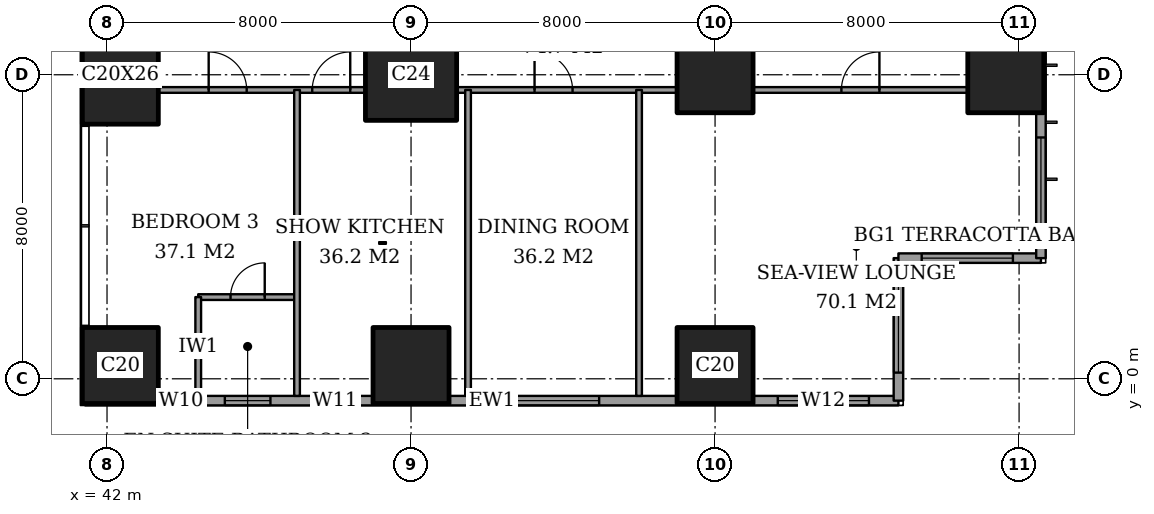
"""IFC4 building model, lengths in metres.
Left out: names, types, materials, properties, quantities, classifications, styles, units other than length and angle.
Written with IfcOpenShell. Run it as: python <this file> out.ifc"""

import sys

from ifc_helpers import new_model, si_unit, direction, frame, frame_2d, origin, origin_2d, place, context, subcontext, project, spatial, rectangle, extrude, element, fill, save


model = new_model("IFC4")
c1 = context("Model", 3, precision=1e-05, world=origin(), true_north=direction((0.0, 1.0)))
c2 = subcontext(c1, "Body", "Model", "MODEL_VIEW")
j1 = project(units=[si_unit("LENGTHUNIT", "METRE"), si_unit("PLANEANGLEUNIT", "RADIAN")], contexts=[c1])
p1 = place(None, origin())
s1 = spatial("IfcSite", under=j1, at=p1, CompositionType="ELEMENT")
p2 = place(p1, origin())
s2 = spatial("IfcBuilding", under=s1, at=p2, CompositionType="ELEMENT")
p3 = place(p2, frame((0.0, 0.0, 110.6)))
s3 = spatial("IfcBuildingStorey", under=s2, at=p3, CompositionType="ELEMENT", Elevation=110.6)
p4 = place(p3, frame((42.35, 0.35, 0.0), z_axis=(0.0, 0.0, 1.0), x_axis=(1.0, 0.0, 0.0)))
e1 = element("IfcColumn", 1, at=p4, inside=s3, PredefinedType="COLUMN", context=c2, shape_type="SweptSolid", body=[
    extrude(rectangle(XDim=2.0, YDim=2.0, at=origin_2d()), origin(), (0.0, 0.0, 1.0), 3.6),
])
p5 = place(p3, frame((42.35, 8.0, 0.0), z_axis=(0.0, 0.0, 1.0), x_axis=(1.0, 0.0, 0.0)))
e2 = element("IfcColumn", 2, at=p5, inside=s3, PredefinedType="COLUMN", context=c2, shape_type="SweptSolid", body=[
    extrude(rectangle(XDim=2.0, YDim=2.6, at=origin_2d()), origin(), (0.0, 0.0, 1.0), 3.6),
])
p6 = place(p3, frame((50.0, 0.35, 0.0), z_axis=(0.0, 0.0, 1.0), x_axis=(1.0, 0.0, 0.0)))
e3 = element("IfcColumn", 3, at=p6, inside=s3, PredefinedType="COLUMN", context=c2, shape_type="SweptSolid", body=[
    extrude(rectangle(XDim=2.0, YDim=2.0, at=origin_2d()), origin(), (0.0, 0.0, 1.0), 3.6),
])
p7 = place(p3, frame((50.0, 8.0, 0.0), z_axis=(0.0, 0.0, 1.0), x_axis=(1.0, 0.0, 0.0)))
e4 = element("IfcColumn", 4, at=p7, inside=s3, PredefinedType="COLUMN", context=c2, shape_type="SweptSolid", body=[
    extrude(rectangle(XDim=2.4, YDim=2.4, at=origin_2d()), origin(), (0.0, 0.0, 1.0), 3.6),
])
for number, where, z_axis, x_axis in (
    (5, (58.0, 0.35, 0.0), (0.0, 0.0, 1.0), (1.0, 0.0, 0.0)),
    (6, (58.0, 8.0, 0.0), (0.0, 0.0, 1.0), (1.0, 0.0, 0.0)),
    (7, (65.65, 8.0, 0.0), (0.0, 0.0, 1.0), (1.0, 0.0, 0.0)),
):
    element("IfcColumn", number, at=place(p3, frame(where, z_axis=z_axis, x_axis=x_axis)), inside=s3, PredefinedType="COLUMN", context=c2, shape_type="SweptSolid", body=[
        extrude(rectangle(XDim=2.0, YDim=2.0, at=origin_2d()), origin(), (0.0, 0.0, 1.0), 3.6),
    ])
p8 = place(p3, frame((41.425, -0.575, 0.0), z_axis=(0.0, 0.0, 1.0), x_axis=(1.0, 0.0, 0.0)))
e8 = element("IfcWall", 8, at=p8, inside=s3, PredefinedType="SOLIDWALL", context=c2, shape_type="SweptSolid", body=[
    extrude(rectangle(XDim=21.4, YDim=0.25, at=frame_2d((10.7, 0.0))), origin(), (0.0, 0.0, 1.0), 3.6),
])
p9 = place(p8, frame((2.225, 0.0, 0.4)))
e9 = element("IfcOpeningElement", 9, at=p9, cuts=e8, PredefinedType="OPENING", context=c2, shape_type="SweptSolid", body=[
    extrude(rectangle(XDim=0.6, YDim=2.2, at=frame_2d((0.3, 1.1))), frame((0.0, 0.135, 0.0), z_axis=(0.0, -1.0, 0.0), x_axis=(1.0, 0.0, 0.0)), (0.0, 0.0, 1.0), 0.27),
])
p10 = place(p8, frame((3.675, 0.0, 0.4)))
e10 = element("IfcOpeningElement", 10, at=p10, cuts=e8, PredefinedType="OPENING", context=c2, shape_type="SweptSolid", body=[
    extrude(rectangle(XDim=1.2, YDim=2.2, at=frame_2d((0.6, 1.1))), frame((0.0, 0.135, 0.0), z_axis=(0.0, -1.0, 0.0), x_axis=(1.0, 0.0, 0.0)), (0.0, 0.0, 1.0), 0.27),
])
p11 = place(p8, frame((5.975, 0.0, 0.4)))
e11 = element("IfcOpeningElement", 11, at=p11, cuts=e8, PredefinedType="OPENING", context=c2, shape_type="SweptSolid", body=[
    extrude(rectangle(XDim=1.2, YDim=2.2, at=frame_2d((0.6, 1.1))), frame((0.0, 0.135, 0.0), z_axis=(0.0, -1.0, 0.0), x_axis=(1.0, 0.0, 0.0)), (0.0, 0.0, 1.0), 0.27),
])
p12 = place(p8, frame((11.125, 0.0, 0.4)))
e12 = element("IfcOpeningElement", 12, at=p12, cuts=e8, PredefinedType="OPENING", context=c2, shape_type="SweptSolid", body=[
    extrude(rectangle(XDim=2.4, YDim=2.2, at=frame_2d((1.2, 1.1))), frame((0.0, 0.135, 0.0), z_axis=(0.0, -1.0, 0.0), x_axis=(1.0, 0.0, 0.0)), (0.0, 0.0, 1.0), 0.27),
])
p13 = place(p8, frame((18.225, 0.0, 0.4)))
e13 = element("IfcOpeningElement", 13, at=p13, cuts=e8, PredefinedType="OPENING", context=c2, shape_type="SweptSolid", body=[
    extrude(rectangle(XDim=2.4, YDim=2.2, at=frame_2d((1.2, 1.1))), frame((0.0, 0.135, 0.0), z_axis=(0.0, -1.0, 0.0), x_axis=(1.0, 0.0, 0.0)), (0.0, 0.0, 1.0), 0.27),
])
p14 = place(p3, frame((62.825, -0.575, 0.0), z_axis=(0.0, 0.0, 1.0), x_axis=(0.0, 1.0, 0.0)))
e14 = element("IfcWall", 14, at=p14, inside=s3, PredefinedType="SOLIDWALL", context=c2, shape_type="SweptSolid", body=[
    extrude(rectangle(XDim=3.75, YDim=0.25, at=frame_2d((1.875, 0.0))), origin(), (0.0, 0.0, 1.0), 3.6),
])
p15 = place(p14, frame((0.738, 0.0, 0.4)))
e15 = element("IfcOpeningElement", 15, at=p15, cuts=e14, PredefinedType="OPENING", context=c2, shape_type="SweptSolid", body=[
    extrude(rectangle(XDim=2.4, YDim=2.2, at=frame_2d((1.2, 1.1))), frame((0.0, 0.135, 0.0), z_axis=(0.0, -1.0, 0.0), x_axis=(1.0, 0.0, 0.0)), (0.0, 0.0, 1.0), 0.27),
])
p16 = place(p3, frame((62.825, 3.175, 0.0), z_axis=(0.0, 0.0, 1.0), x_axis=(1.0, 0.0, 0.0)))
e16 = element("IfcWall", 16, at=p16, inside=s3, PredefinedType="SOLIDWALL", context=c2, shape_type="SweptSolid", body=[
    extrude(rectangle(XDim=3.75, YDim=0.25, at=frame_2d((1.875, 0.0))), origin(), (0.0, 0.0, 1.0), 3.6),
])
p17 = place(p16, frame((0.613, 0.0, 0.4)))
e17 = element("IfcOpeningElement", 17, at=p17, cuts=e16, PredefinedType="OPENING", context=c2, shape_type="SweptSolid", body=[
    extrude(rectangle(XDim=2.4, YDim=2.2, at=frame_2d((1.2, 1.1))), frame((0.0, 0.135, 0.0), z_axis=(0.0, -1.0, 0.0), x_axis=(1.0, 0.0, 0.0)), (0.0, 0.0, 1.0), 0.27),
])
p18 = place(p3, frame((66.575, 3.175, 0.0), z_axis=(0.0, 0.0, 1.0), x_axis=(0.0, 1.0, 0.0)))
e18 = element("IfcWall", 18, at=p18, inside=s3, PredefinedType="SOLIDWALL", context=c2, shape_type="SweptSolid", body=[
    extrude(rectangle(XDim=41.65, YDim=0.25, at=frame_2d((20.825, 0.0))), origin(), (0.0, 0.0, 1.0), 3.6),
])
p19 = place(p18, frame((0.775, 0.0, 0.4)))
e19 = element("IfcOpeningElement", 19, at=p19, cuts=e18, PredefinedType="OPENING", context=c2, shape_type="SweptSolid", body=[
    extrude(rectangle(XDim=2.4, YDim=2.2, at=frame_2d((1.2, 1.1))), frame((0.0, 0.135, 0.0), z_axis=(0.0, -1.0, 0.0), x_axis=(1.0, 0.0, 0.0)), (0.0, 0.0, 1.0), 0.27),
])
p20 = place(p18, frame((6.1, 0.0, 0.4)))
e20 = element("IfcOpeningElement", 20, at=p20, cuts=e18, PredefinedType="OPENING", context=c2, shape_type="SweptSolid", body=[
    extrude(rectangle(XDim=1.2, YDim=2.2, at=frame_2d((0.6, 1.1))), frame((0.0, 0.135, 0.0), z_axis=(0.0, -1.0, 0.0), x_axis=(1.0, 0.0, 0.0)), (0.0, 0.0, 1.0), 0.27),
])
p21 = place(p18, frame((8.275, 0.0, 0.4)))
e21 = element("IfcOpeningElement", 21, at=p21, cuts=e18, PredefinedType="OPENING", context=c2, shape_type="SweptSolid", body=[
    extrude(rectangle(XDim=2.4, YDim=2.2, at=frame_2d((1.2, 1.1))), frame((0.0, 0.135, 0.0), z_axis=(0.0, -1.0, 0.0), x_axis=(1.0, 0.0, 0.0)), (0.0, 0.0, 1.0), 0.27),
])
p22 = place(p18, frame((15.775, 0.0, 0.4)))
e22 = element("IfcOpeningElement", 22, at=p22, cuts=e18, PredefinedType="OPENING", context=c2, shape_type="SweptSolid", body=[
    extrude(rectangle(XDim=2.4, YDim=2.2, at=frame_2d((1.2, 1.1))), frame((0.0, 0.135, 0.0), z_axis=(0.0, -1.0, 0.0), x_axis=(1.0, 0.0, 0.0)), (0.0, 0.0, 1.0), 0.27),
])
p23 = place(p18, frame((23.475, 0.0, 0.4)))
e23 = element("IfcOpeningElement", 23, at=p23, cuts=e18, PredefinedType="OPENING", context=c2, shape_type="SweptSolid", body=[
    extrude(rectangle(XDim=2.4, YDim=2.2, at=frame_2d((1.2, 1.1))), frame((0.0, 0.135, 0.0), z_axis=(0.0, -1.0, 0.0), x_axis=(1.0, 0.0, 0.0)), (0.0, 0.0, 1.0), 0.27),
])
p24 = place(p18, frame((30.975, 0.0, 0.4)))
e24 = element("IfcOpeningElement", 24, at=p24, cuts=e18, PredefinedType="OPENING", context=c2, shape_type="SweptSolid", body=[
    extrude(rectangle(XDim=2.4, YDim=2.2, at=frame_2d((1.2, 1.1))), frame((0.0, 0.135, 0.0), z_axis=(0.0, -1.0, 0.0), x_axis=(1.0, 0.0, 0.0)), (0.0, 0.0, 1.0), 0.27),
])
p25 = place(p18, frame((34.5, 0.0, 0.4)))
e25 = element("IfcOpeningElement", 25, at=p25, cuts=e18, PredefinedType="OPENING", context=c2, shape_type="SweptSolid", body=[
    extrude(rectangle(XDim=1.2, YDim=2.2, at=frame_2d((0.6, 1.1))), frame((0.0, 0.135, 0.0), z_axis=(0.0, -1.0, 0.0), x_axis=(1.0, 0.0, 0.0)), (0.0, 0.0, 1.0), 0.27),
])
p26 = place(p18, frame((38.475, 0.0, 0.4)))
e26 = element("IfcOpeningElement", 26, at=p26, cuts=e18, PredefinedType="OPENING", context=c2, shape_type="SweptSolid", body=[
    extrude(rectangle(XDim=2.4, YDim=2.2, at=frame_2d((1.2, 1.1))), frame((0.0, 0.135, 0.0), z_axis=(0.0, -1.0, 0.0), x_axis=(1.0, 0.0, 0.0)), (0.0, 0.0, 1.0), 0.27),
])
p27 = place(p3, frame((44.4, 2.15, 0.0), z_axis=(0.0, 0.0, 1.0), x_axis=(1.0, 0.0, 0.0)))
e27 = element("IfcWall", 27, at=p27, inside=s3, PredefinedType="PARTITIONING", context=c2, shape_type="SweptSolid", body=[
    extrude(rectangle(XDim=2.6, YDim=0.15, at=frame_2d((1.3, 0.0))), origin(), (0.0, 0.0, 1.0), 3.35),
])
p28 = place(p27, frame((0.85, 0.0, 0.0)))
e28 = element("IfcOpeningElement", 28, at=p28, cuts=e27, PredefinedType="OPENING", context=c2, shape_type="SweptSolid", body=[
    extrude(rectangle(XDim=0.9, YDim=2.1, at=frame_2d((0.45, 1.05))), frame((0.0, 0.085, 0.0), z_axis=(0.0, -1.0, 0.0), x_axis=(1.0, 0.0, 0.0)), (0.0, 0.0, 1.0), 0.17),
])
p29 = place(p3, frame((43.35, 7.6, 0.0), z_axis=(0.0, 0.0, 1.0), x_axis=(1.0, 0.0, 0.0)))
e29 = element("IfcWall", 29, at=p29, inside=s3, PredefinedType="PARTITIONING", context=c2, shape_type="SweptSolid", body=[
    extrude(rectangle(XDim=5.45, YDim=0.15, at=frame_2d((2.725, 0.0))), origin(), (0.0, 0.0, 1.0), 3.35),
])
p30 = place(p29, frame((4.05, 0.0, 0.0)))
e30 = element("IfcOpeningElement", 30, at=p30, cuts=e29, PredefinedType="OPENING", context=c2, shape_type="SweptSolid", body=[
    extrude(rectangle(XDim=1.0, YDim=2.1, at=frame_2d((0.5, 1.05))), frame((0.0, 0.085, 0.0), z_axis=(0.0, -1.0, 0.0), x_axis=(1.0, 0.0, 0.0)), (0.0, 0.0, 1.0), 0.17),
])
p31 = place(p29, frame((1.325, 0.0, 0.0)))
e31 = element("IfcOpeningElement", 31, at=p31, cuts=e29, PredefinedType="OPENING", context=c2, shape_type="SweptSolid", body=[
    extrude(rectangle(XDim=1.0, YDim=2.1, at=frame_2d((0.5, 1.05))), frame((0.0, 0.085, 0.0), z_axis=(0.0, -1.0, 0.0), x_axis=(1.0, 0.0, 0.0)), (0.0, 0.0, 1.0), 0.17),
])
p32 = place(p3, frame((51.2, 7.6, 0.0), z_axis=(0.0, 0.0, 1.0), x_axis=(1.0, 0.0, 0.0)))
e32 = element("IfcWall", 32, at=p32, inside=s3, PredefinedType="PARTITIONING", context=c2, shape_type="SweptSolid", body=[
    extrude(rectangle(XDim=5.8, YDim=0.15, at=frame_2d((2.9, 0.0))), origin(), (0.0, 0.0, 1.0), 3.35),
])
p33 = place(p32, frame((2.05, 0.0, 0.0)))
e33 = element("IfcOpeningElement", 33, at=p33, cuts=e32, PredefinedType="OPENING", context=c2, shape_type="SweptSolid", body=[
    extrude(rectangle(XDim=1.0, YDim=2.1, at=frame_2d((0.5, 1.05))), frame((0.0, 0.085, 0.0), z_axis=(0.0, -1.0, 0.0), x_axis=(1.0, 0.0, 0.0)), (0.0, 0.0, 1.0), 0.17),
])
p34 = place(p3, frame((59.0, 7.6, 0.0), z_axis=(0.0, 0.0, 1.0), x_axis=(1.0, 0.0, 0.0)))
e34 = element("IfcWall", 34, at=p34, inside=s3, PredefinedType="PARTITIONING", context=c2, shape_type="SweptSolid", body=[
    extrude(rectangle(XDim=5.65, YDim=0.15, at=frame_2d((2.825, 0.0))), origin(), (0.0, 0.0, 1.0), 3.35),
])
p35 = place(p34, frame((2.325, 0.0, 0.0)))
e35 = element("IfcOpeningElement", 35, at=p35, cuts=e34, PredefinedType="OPENING", context=c2, shape_type="SweptSolid", body=[
    extrude(rectangle(XDim=1.0, YDim=2.1, at=frame_2d((0.5, 1.05))), frame((0.0, 0.085, 0.0), z_axis=(0.0, -1.0, 0.0), x_axis=(1.0, 0.0, 0.0)), (0.0, 0.0, 1.0), 0.17),
])
p36 = place(p3, frame((44.4, -0.45, 0.0), z_axis=(0.0, 0.0, 1.0), x_axis=(0.0, 1.0, 0.0)))
e36 = element("IfcWall", 36, at=p36, inside=s3, PredefinedType="PARTITIONING", context=c2, shape_type="SweptSolid", body=[
    extrude(rectangle(XDim=2.6, YDim=0.15, at=frame_2d((1.3, 0.0))), origin(), (0.0, 0.0, 1.0), 3.35),
])
for number, where, z_axis, x_axis in (
    (37, (47.0, -0.45, 0.0), (0.0, 0.0, 1.0), (0.0, 1.0, 0.0)),
    (38, (51.5, -0.45, 0.0), (0.0, 0.0, 1.0), (0.0, 1.0, 0.0)),
    (39, (56.0, -0.45, 0.0), (0.0, 0.0, 1.0), (0.0, 1.0, 0.0)),
):
    element("IfcWall", number, at=place(p3, frame(where, z_axis=z_axis, x_axis=x_axis)), inside=s3, PredefinedType="PARTITIONING", context=c2, shape_type="SweptSolid", body=[
        extrude(rectangle(XDim=8.05, YDim=0.15, at=frame_2d((4.025, 0.0))), origin(), (0.0, 0.0, 1.0), 3.35),
    ])
p37 = place(p9, origin())
e40 = element("IfcWindow", 40, at=p37, inside=s3, PartitioningType="SINGLE_PANEL", PredefinedType="WINDOW", context=c2, shape_type="SweptSolid", body=[
    extrude(rectangle(XDim=0.6, YDim=2.2, at=frame_2d((0.3, 1.1))), frame((0.0, 0.03, 0.0), z_axis=(0.0, -1.0, 0.0), x_axis=(1.0, 0.0, 0.0)), (0.0, 0.0, 1.0), 0.06),
])
fill(e9, e40)
p38 = place(p10, origin())
e41 = element("IfcWindow", 41, at=p38, inside=s3, PartitioningType="SINGLE_PANEL", PredefinedType="WINDOW", context=c2, shape_type="SweptSolid", body=[
    extrude(rectangle(XDim=1.2, YDim=2.2, at=frame_2d((0.6, 1.1))), frame((0.0, 0.03, 0.0), z_axis=(0.0, -1.0, 0.0), x_axis=(1.0, 0.0, 0.0)), (0.0, 0.0, 1.0), 0.06),
])
fill(e10, e41)
p39 = place(p11, origin())
e42 = element("IfcWindow", 42, at=p39, inside=s3, PartitioningType="SINGLE_PANEL", PredefinedType="WINDOW", context=c2, shape_type="SweptSolid", body=[
    extrude(rectangle(XDim=1.2, YDim=2.2, at=frame_2d((0.6, 1.1))), frame((0.0, 0.03, 0.0), z_axis=(0.0, -1.0, 0.0), x_axis=(1.0, 0.0, 0.0)), (0.0, 0.0, 1.0), 0.06),
])
fill(e11, e42)
p40 = place(p12, origin())
e43 = element("IfcWindow", 43, at=p40, inside=s3, PartitioningType="SINGLE_PANEL", PredefinedType="WINDOW", context=c2, shape_type="SweptSolid", body=[
    extrude(rectangle(XDim=2.4, YDim=2.2, at=frame_2d((1.2, 1.1))), frame((0.0, 0.03, 0.0), z_axis=(0.0, -1.0, 0.0), x_axis=(1.0, 0.0, 0.0)), (0.0, 0.0, 1.0), 0.06),
])
fill(e12, e43)
p41 = place(p13, origin())
e44 = element("IfcWindow", 44, at=p41, inside=s3, PartitioningType="SINGLE_PANEL", PredefinedType="WINDOW", context=c2, shape_type="SweptSolid", body=[
    extrude(rectangle(XDim=2.4, YDim=2.2, at=frame_2d((1.2, 1.1))), frame((0.0, 0.03, 0.0), z_axis=(0.0, -1.0, 0.0), x_axis=(1.0, 0.0, 0.0)), (0.0, 0.0, 1.0), 0.06),
])
fill(e13, e44)
p42 = place(p15, origin())
e45 = element("IfcWindow", 45, at=p42, inside=s3, PartitioningType="SINGLE_PANEL", PredefinedType="WINDOW", context=c2, shape_type="SweptSolid", body=[
    extrude(rectangle(XDim=2.4, YDim=2.2, at=frame_2d((1.2, 1.1))), frame((0.0, 0.03, 0.0), z_axis=(0.0, -1.0, 0.0), x_axis=(1.0, 0.0, 0.0)), (0.0, 0.0, 1.0), 0.06),
])
fill(e15, e45)
p43 = place(p17, origin())
e46 = element("IfcWindow", 46, at=p43, inside=s3, PartitioningType="SINGLE_PANEL", PredefinedType="WINDOW", context=c2, shape_type="SweptSolid", body=[
    extrude(rectangle(XDim=2.4, YDim=2.2, at=frame_2d((1.2, 1.1))), frame((0.0, 0.03, 0.0), z_axis=(0.0, -1.0, 0.0), x_axis=(1.0, 0.0, 0.0)), (0.0, 0.0, 1.0), 0.06),
])
fill(e17, e46)
p44 = place(p19, origin())
e47 = element("IfcWindow", 47, at=p44, inside=s3, PartitioningType="SINGLE_PANEL", PredefinedType="WINDOW", context=c2, shape_type="SweptSolid", body=[
    extrude(rectangle(XDim=2.4, YDim=2.2, at=frame_2d((1.2, 1.1))), frame((0.0, 0.03, 0.0), z_axis=(0.0, -1.0, 0.0), x_axis=(1.0, 0.0, 0.0)), (0.0, 0.0, 1.0), 0.06),
])
fill(e19, e47)
p45 = place(p35, origin())
e48 = element("IfcDoor", 48, at=p45, inside=s3, OperationType="SINGLE_SWING_LEFT", PredefinedType="DOOR", context=c2, shape_type="SweptSolid", body=[
    extrude(rectangle(XDim=1.0, YDim=2.1, at=frame_2d((0.5, 1.05))), frame((0.0, 0.025, 0.0), z_axis=(0.0, -1.0, 0.0), x_axis=(1.0, 0.0, 0.0)), (0.0, 0.0, 1.0), 0.05),
])
fill(e35, e48)
p46 = place(p33, origin())
e49 = element("IfcDoor", 49, at=p46, inside=s3, OperationType="SINGLE_SWING_RIGHT", PredefinedType="DOOR", context=c2, shape_type="SweptSolid", body=[
    extrude(rectangle(XDim=1.0, YDim=2.1, at=frame_2d((0.5, 1.05))), frame((0.0, 0.025, 0.0), z_axis=(0.0, -1.0, 0.0), x_axis=(1.0, 0.0, 0.0)), (0.0, 0.0, 1.0), 0.05),
])
fill(e33, e49)
p47 = place(p30, origin())
e50 = element("IfcDoor", 50, at=p47, inside=s3, OperationType="SINGLE_SWING_LEFT", PredefinedType="DOOR", context=c2, shape_type="SweptSolid", body=[
    extrude(rectangle(XDim=1.0, YDim=2.1, at=frame_2d((0.5, 1.05))), frame((0.0, 0.025, 0.0), z_axis=(0.0, -1.0, 0.0), x_axis=(1.0, 0.0, 0.0)), (0.0, 0.0, 1.0), 0.05),
])
fill(e30, e50)
p48 = place(p28, origin())
e51 = element("IfcDoor", 51, at=p48, inside=s3, OperationType="SINGLE_SWING_LEFT", PredefinedType="DOOR", context=c2, shape_type="SweptSolid", body=[
    extrude(rectangle(XDim=0.9, YDim=2.1, at=frame_2d((0.45, 1.05))), frame((0.0, 0.025, 0.0), z_axis=(0.0, -1.0, 0.0), x_axis=(1.0, 0.0, 0.0)), (0.0, 0.0, 1.0), 0.05),
])
fill(e28, e51)
p49 = place(p31, origin())
e52 = element("IfcDoor", 52, at=p49, inside=s3, OperationType="SINGLE_SWING_RIGHT", PredefinedType="DOOR", context=c2, shape_type="SweptSolid", body=[
    extrude(rectangle(XDim=1.0, YDim=2.1, at=frame_2d((0.5, 1.05))), frame((0.0, 0.025, 0.0), z_axis=(0.0, -1.0, 0.0), x_axis=(1.0, 0.0, 0.0)), (0.0, 0.0, 1.0), 0.05),
])
fill(e31, e52)
save(model, sys.argv[1])
